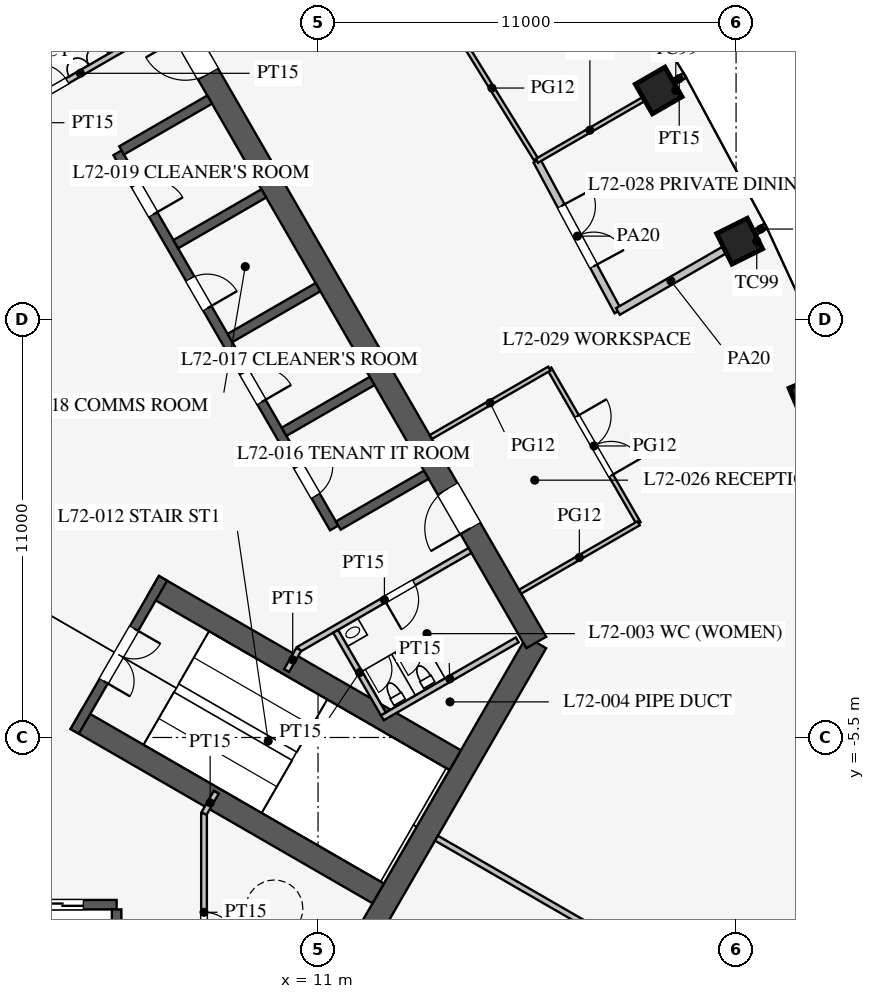
"""IFC4 building model, lengths in metres.
Left out: names, types, materials, properties, quantities, classifications, styles, units other than length and angle.
Written with IfcOpenShell. Run it as: python <this file> out.ifc"""

import sys

from ifc_helpers import new_model, si_unit, direction, frame, frame_2d, origin, origin_2d, place, context, subcontext, project, spatial, rectangle, extrude, element, fill, save


model = new_model("IFC4")
c1 = context("Model", 3, precision=1e-05, world=origin(), true_north=direction((0.0, 1.0)))
c2 = subcontext(c1, "Body", "Model", "MODEL_VIEW")
j1 = project(units=[si_unit("LENGTHUNIT", "METRE"), si_unit("PLANEANGLEUNIT", "RADIAN")], contexts=[c1])
p1 = place(None, origin())
s1 = spatial("IfcSite", under=j1, at=p1, CompositionType="ELEMENT")
p2 = place(p1, origin())
s2 = spatial("IfcBuilding", under=s1, at=p2, CompositionType="ELEMENT")
p3 = place(p2, frame((0.0, 0.0, 314.1)))
s3 = spatial("IfcBuildingStorey", under=s2, at=p3, CompositionType="ELEMENT", Elevation=314.1)
for number, where, z_axis, x_axis in (
    (1, (23.985, 3.455, 0.0), (0.0, 0.0, 1.0), (-0.391, 0.92, 0.0)),
    (2, (22.094, 7.56, 0.0), (0.0, 0.0, 1.0), (-0.447, 0.895, 0.0)),
    (3, (19.963, 11.526, 0.0), (0.0, 0.0, 1.0), (-0.5, 0.866, 0.0)),
):
    element("IfcColumn", number, at=place(p3, frame(where, z_axis=z_axis, x_axis=x_axis)), inside=s3, PredefinedType="COLUMN", context=c2, shape_type="SweptSolid", body=[
        extrude(rectangle(XDim=0.9, YDim=0.9, at=origin_2d()), origin(), (0.0, 0.0, 1.0), 4.2),
    ])
p4 = place(p3, frame((10.97, -13.0, 0.0), z_axis=(0.0, 0.0, 1.0), x_axis=(0.499995765644, 0.866027848477, 0.0)))
e4 = element("IfcWall", 4, at=p4, inside=s3, PredefinedType="SHEAR", context=c2, shape_type="SweptSolid", body=[
    extrude(rectangle(XDim=11.547, YDim=0.6, at=frame_2d((5.773, 0.0))), origin(), (0.0, 0.0, 1.0), 4.2),
])
p5 = place(p3, frame((16.743, -3.0, 0.0), z_axis=(0.0, 0.0, 1.0), x_axis=(-0.500002442456, 0.866023993627, 0.0)))
e5 = element("IfcWall", 5, at=p5, inside=s3, PredefinedType="SHEAR", context=c2, shape_type="SweptSolid", body=[
    extrude(rectangle(XDim=21.939, YDim=0.6, at=frame_2d((10.97, 0.0))), origin(), (0.0, 0.0, 1.0), 4.2),
])
p6 = place(p5, frame((17.27, 0.0, 0.0)))
e6 = element("IfcOpeningElement", 6, at=p6, cuts=e5, PredefinedType="OPENING", context=c2, shape_type="SweptSolid", body=[
    extrude(rectangle(XDim=1.2, YDim=2.1, at=frame_2d((0.6, 1.05))), frame((0.0, 0.31, 0.0), z_axis=(0.0, -1.0, 0.0), x_axis=(1.0, 0.0, 0.0)), (0.0, 0.0, 1.0), 0.62),
])
p7 = place(p5, frame((3.47, 0.0, 0.0)))
e7 = element("IfcOpeningElement", 7, at=p7, cuts=e5, PredefinedType="OPENING", context=c2, shape_type="SweptSolid", body=[
    extrude(rectangle(XDim=1.2, YDim=2.1, at=frame_2d((0.6, 1.05))), frame((0.0, 0.31, 0.0), z_axis=(0.0, -1.0, 0.0), x_axis=(1.0, 0.0, 0.0)), (0.0, 0.0, 1.0), 0.62),
])
p8 = place(p3, frame((-5.7, -9.9, 0.0), z_axis=(0.0, 0.0, 1.0), x_axis=(1.0, 0.0, 0.0)))
e8 = element("IfcWall", 8, at=p8, inside=s3, PredefinedType="SHEAR", context=c2, shape_type="SweptSolid", body=[
    extrude(rectangle(XDim=11.4, YDim=0.25, at=frame_2d((5.7, 0.0))), origin(), (0.0, 0.0, 1.0), 4.2),
])
p9 = place(p8, frame((0.875, 0.0, 0.0)))
e9 = element("IfcOpeningElement", 9, at=p9, cuts=e8, PredefinedType="OPENING", context=c2, shape_type="SweptSolid", body=[
    extrude(rectangle(XDim=1.1, YDim=2.2, at=frame_2d((0.55, 1.1))), frame((0.0, 0.135, 0.0), z_axis=(0.0, -1.0, 0.0), x_axis=(1.0, 0.0, 0.0)), (0.0, 0.0, 1.0), 0.27),
])
p10 = place(p8, frame((3.725, 0.0, 0.0)))
e10 = element("IfcOpeningElement", 10, at=p10, cuts=e8, PredefinedType="OPENING", context=c2, shape_type="SweptSolid", body=[
    extrude(rectangle(XDim=1.1, YDim=2.2, at=frame_2d((0.55, 1.1))), frame((0.0, 0.135, 0.0), z_axis=(0.0, -1.0, 0.0), x_axis=(1.0, 0.0, 0.0)), (0.0, 0.0, 1.0), 0.27),
])
p11 = place(p8, frame((6.575, 0.0, 0.0)))
e11 = element("IfcOpeningElement", 11, at=p11, cuts=e8, PredefinedType="OPENING", context=c2, shape_type="SweptSolid", body=[
    extrude(rectangle(XDim=1.1, YDim=2.2, at=frame_2d((0.55, 1.1))), frame((0.0, 0.135, 0.0), z_axis=(0.0, -1.0, 0.0), x_axis=(1.0, 0.0, 0.0)), (0.0, 0.0, 1.0), 0.27),
])
p12 = place(p8, frame((9.425, 0.0, 0.0)))
e12 = element("IfcOpeningElement", 12, at=p12, cuts=e8, PredefinedType="OPENING", context=c2, shape_type="SweptSolid", body=[
    extrude(rectangle(XDim=1.1, YDim=2.2, at=frame_2d((0.55, 1.1))), frame((0.0, 0.135, 0.0), z_axis=(0.0, -1.0, 0.0), x_axis=(1.0, 0.0, 0.0)), (0.0, 0.0, 1.0), 0.27),
])
p13 = place(p3, frame((5.7, -10.025, 0.0), z_axis=(0.0, 0.0, 1.0), x_axis=(0.0, -1.0, 0.0)))
e13 = element("IfcWall", 13, at=p13, inside=s3, PredefinedType="SHEAR", context=c2, shape_type="SweptSolid", body=[
    extrude(rectangle(XDim=2.675, YDim=0.25, at=frame_2d((1.337, 0.0))), origin(), (0.0, 0.0, 1.0), 4.2),
])
p14 = place(p3, frame((11.424, 0.014, 0.0), z_axis=(0.0, 0.0, 1.0), x_axis=(-0.500001763848, 0.866024385424, 0.0)))
e14 = element("IfcWall", 14, at=p14, inside=s3, PredefinedType="SHEAR", context=c2, shape_type="SweptSolid", body=[
    extrude(rectangle(XDim=11.4, YDim=0.25, at=frame_2d((5.7, 0.0))), origin(), (0.0, 0.0, 1.0), 4.2),
])
p15 = place(p14, frame((0.975, 0.0, 0.0)))
e15 = element("IfcOpeningElement", 15, at=p15, cuts=e14, PredefinedType="OPENING", context=c2, shape_type="SweptSolid", body=[
    extrude(rectangle(XDim=0.9, YDim=2.1, at=frame_2d((0.45, 1.05))), frame((0.0, 0.135, 0.0), z_axis=(0.0, -1.0, 0.0), x_axis=(1.0, 0.0, 0.0)), (0.0, 0.0, 1.0), 0.27),
])
p16 = place(p14, frame((3.825, 0.0, 0.0)))
e16 = element("IfcOpeningElement", 16, at=p16, cuts=e14, PredefinedType="OPENING", context=c2, shape_type="SweptSolid", body=[
    extrude(rectangle(XDim=0.9, YDim=2.1, at=frame_2d((0.45, 1.05))), frame((0.0, 0.135, 0.0), z_axis=(0.0, -1.0, 0.0), x_axis=(1.0, 0.0, 0.0)), (0.0, 0.0, 1.0), 0.27),
])
p17 = place(p14, frame((6.675, 0.0, 0.0)))
e17 = element("IfcOpeningElement", 17, at=p17, cuts=e14, PredefinedType="OPENING", context=c2, shape_type="SweptSolid", body=[
    extrude(rectangle(XDim=0.9, YDim=2.1, at=frame_2d((0.45, 1.05))), frame((0.0, 0.135, 0.0), z_axis=(0.0, -1.0, 0.0), x_axis=(1.0, 0.0, 0.0)), (0.0, 0.0, 1.0), 0.27),
])
p18 = place(p14, frame((9.525, 0.0, 0.0)))
e18 = element("IfcOpeningElement", 18, at=p18, cuts=e14, PredefinedType="OPENING", context=c2, shape_type="SweptSolid", body=[
    extrude(rectangle(XDim=0.9, YDim=2.1, at=frame_2d((0.45, 1.05))), frame((0.0, 0.135, 0.0), z_axis=(0.0, -1.0, 0.0), x_axis=(1.0, 0.0, 0.0)), (0.0, 0.0, 1.0), 0.27),
])
for number, where, z_axis, x_axis in (
    (19, (11.532, 0.076, 0.0), (0.0, 0.0, 1.0), (0.866, 0.5, 0.0)),
    (20, (10.107, 2.544, 0.0), (0.0, 0.0, 1.0), (0.866, 0.5, 0.0)),
    (21, (8.682, 5.012, 0.0), (0.0, 0.0, 1.0), (0.866, 0.5, 0.0)),
    (22, (7.257, 7.481, 0.0), (0.0, 0.0, 1.0), (0.866, 0.5, 0.0)),
    (23, (5.832, 9.949, 0.0), (0.0, 0.0, 1.0), (0.866, 0.5, 0.0)),
):
    element("IfcWall", number, at=place(p3, frame(where, z_axis=z_axis, x_axis=x_axis)), inside=s3, PredefinedType="SHEAR", context=c2, shape_type="SweptSolid", body=[
        extrude(rectangle(XDim=2.675, YDim=0.25, at=frame_2d((1.337, 0.0))), origin(), (0.0, 0.0, 1.0), 4.2),
    ])
p19 = place(p3, frame((4.638, -5.016, 0.0), z_axis=(0.0, 0.0, 1.0), x_axis=(0.866012320003, -0.50002266109, 0.0)))
e24 = element("IfcWall", 24, at=p19, inside=s3, PredefinedType="SHEAR", context=c2, shape_type="SweptSolid", body=[
    extrude(rectangle(XDim=9.175, YDim=0.6, at=frame_2d((4.587, 0.0))), origin(), (0.0, 0.0, 1.0), 4.2),
])
p20 = place(p3, frame((6.663, -1.509, 0.0), z_axis=(0.0, 0.0, 1.0), x_axis=(0.86603049496, -0.499991181721, 0.0)))
e25 = element("IfcWall", 25, at=p20, inside=s3, PredefinedType="SHEAR", context=c2, shape_type="SweptSolid", body=[
    extrude(rectangle(XDim=9.175, YDim=0.6, at=frame_2d((4.587, 0.0))), origin(), (0.0, 0.0, 1.0), 4.2),
])
p21 = place(p3, frame((4.597, -5.339, 0.0), z_axis=(0.0, 0.0, 1.0), x_axis=(0.499984536904, 0.866034331223, 0.0)))
e26 = element("IfcWall", 26, at=p21, inside=s3, PredefinedType="SHEAR", context=c2, shape_type="SweptSolid", body=[
    extrude(rectangle(XDim=4.65, YDim=0.25, at=frame_2d((2.325, 0.0))), origin(), (0.0, 0.0, 1.0), 4.2),
])
p22 = place(p21, frame((1.525, 0.0, 0.0)))
e27 = element("IfcOpeningElement", 27, at=p22, cuts=e26, PredefinedType="OPENING", context=c2, shape_type="SweptSolid", body=[
    extrude(rectangle(XDim=1.6, YDim=2.1, at=frame_2d((0.8, 1.05))), frame((0.0, 0.135, 0.0), z_axis=(0.0, -1.0, 0.0), x_axis=(1.0, 0.0, 0.0)), (0.0, 0.0, 1.0), 0.27),
])
p23 = place(p3, frame((8.0, -7.5, 0.0), z_axis=(0.0, 0.0, 1.0), x_axis=(0.0, -1.0, 0.0)))
e28 = element("IfcWall", 28, at=p23, inside=s3, PredefinedType="PARTITIONING", context=c2, shape_type="SweptSolid", body=[
    extrude(rectangle(XDim=5.2, YDim=0.15, at=frame_2d((2.6, 0.0))), origin(), (0.0, 0.0, 1.0), 4.0),
])
p24 = place(p23, frame((2.6, 0.0, 0.0)))
e29 = element("IfcOpeningElement", 29, at=p24, cuts=e28, PredefinedType="OPENING", context=c2, shape_type="SweptSolid", body=[
    extrude(rectangle(XDim=0.9, YDim=2.1, at=frame_2d((0.45, 1.05))), frame((0.0, 0.085, 0.0), z_axis=(0.0, -1.0, 0.0), x_axis=(1.0, 0.0, 0.0)), (0.0, 0.0, 1.0), 0.17),
])
p25 = place(p3, frame((2.495, 10.678, 0.0), z_axis=(0.0, 0.0, 1.0), x_axis=(0.866021400173, 0.500006934395, 0.0)))
e30 = element("IfcWall", 30, at=p25, inside=s3, PredefinedType="PARTITIONING", context=c2, shape_type="SweptSolid", body=[
    extrude(rectangle(XDim=5.2, YDim=0.15, at=frame_2d((2.6, 0.0))), origin(), (0.0, 0.0, 1.0), 4.0),
])
p26 = place(p25, frame((1.3, 0.0, 0.0)))
e31 = element("IfcOpeningElement", 31, at=p26, cuts=e30, PredefinedType="OPENING", context=c2, shape_type="SweptSolid", body=[
    extrude(rectangle(XDim=0.9, YDim=2.1, at=frame_2d((0.45, 1.05))), frame((0.0, 0.085, 0.0), z_axis=(0.0, -1.0, 0.0), x_axis=(1.0, 0.0, 0.0)), (0.0, 0.0, 1.0), 0.17),
])
p27 = place(p3, frame((10.495, -3.178, 0.0), z_axis=(0.0, 0.0, 1.0), x_axis=(0.866021400173, 0.500006934395, 0.0)))
e32 = element("IfcWall", 32, at=p27, inside=s3, PredefinedType="PARTITIONING", context=c2, shape_type="SweptSolid", body=[
    extrude(rectangle(XDim=5.2, YDim=0.15, at=frame_2d((2.6, 0.0))), origin(), (0.0, 0.0, 1.0), 4.0),
])
p28 = place(p27, frame((2.6, 0.0, 0.0)))
e33 = element("IfcOpeningElement", 33, at=p28, cuts=e32, PredefinedType="OPENING", context=c2, shape_type="SweptSolid", body=[
    extrude(rectangle(XDim=0.9, YDim=2.1, at=frame_2d((0.45, 1.05))), frame((0.0, 0.085, 0.0), z_axis=(0.0, -1.0, 0.0), x_axis=(1.0, 0.0, 0.0)), (0.0, 0.0, 1.0), 0.17),
])
for number, where, z_axis, x_axis in (
    (34, (8.0, -7.5, 0.0), (0.0, 0.0, 1.0), (0.5, 0.866, 0.0)),
    (35, (10.495, -3.178, 0.0), (0.0, 0.0, 1.0), (-0.5, -0.866, 0.0)),
):
    element("IfcWall", number, at=place(p3, frame(where, z_axis=z_axis, x_axis=x_axis)), inside=s3, PredefinedType="PARTITIONING", context=c2, shape_type="SweptSolid", body=[
        extrude(rectangle(XDim=0.645, YDim=0.15, at=frame_2d((0.323, 0.0))), origin(), (0.0, 0.0, 1.0), 4.0),
    ])
p29 = place(p3, frame((12.691, -4.982, 0.0), z_axis=(0.0, 0.0, 1.0), x_axis=(0.8660249478, 0.500000789788, 0.0)))
e36 = element("IfcWall", 36, at=p29, inside=s3, PredefinedType="PARTITIONING", context=c2, shape_type="SweptSolid", body=[
    extrude(rectangle(XDim=4.1, YDim=0.15, at=frame_2d((2.05, 0.0))), origin(), (0.0, 0.0, 1.0), 4.0),
])
p30 = place(p3, frame((11.464, -2.706, 0.0), z_axis=(0.0, 0.0, 1.0), x_axis=(0.50001992892, -0.866013897511, 0.0)))
e37 = element("IfcWall", 37, at=p30, inside=s3, PredefinedType="PARTITIONING", context=c2, shape_type="SweptSolid", body=[
    extrude(rectangle(XDim=2.51, YDim=0.15, at=frame_2d((1.255, 0.0))), origin(), (0.0, 0.0, 1.0), 4.0),
])
p31 = place(p3, frame((14.116, -8.15, 0.0), z_axis=(0.0, 0.0, 1.0), x_axis=(0.866020541135, -0.500008422262, 0.0)))
e38 = element("IfcWall", 38, at=p31, inside=s3, PredefinedType="PARTITIONING", context=c2, shape_type="SweptSolid", body=[
    extrude(rectangle(XDim=13.45, YDim=0.15, at=frame_2d((6.725, 0.0))), origin(), (0.0, 0.0, 1.0), 2.5),
])
p32 = place(p3, frame((19.436, 0.136, 0.0), z_axis=(0.0, 0.0, 1.0), x_axis=(-0.499977259774, 0.866038532462, 0.0)))
e39 = element("IfcWall", 39, at=p32, inside=s3, PredefinedType="PARTITIONING", context=c2, shape_type="SweptSolid", body=[
    extrude(rectangle(XDim=4.7, YDim=0.12, at=frame_2d((2.35, 0.0))), origin(), (0.0, 0.0, 1.0), 2.9),
])
p33 = place(p32, frame((1.45, 0.0, 0.15)))
e40 = element("IfcOpeningElement", 40, at=p33, cuts=e39, PredefinedType="OPENING", context=c2, shape_type="SweptSolid", body=[
    extrude(rectangle(XDim=1.8, YDim=2.1, at=frame_2d((0.9, 1.05))), frame((0.0, 0.07, 0.0), z_axis=(0.0, -1.0, 0.0), x_axis=(1.0, 0.0, 0.0)), (0.0, 0.0, 1.0), 0.14),
])
p34 = place(p3, frame((13.968, 2.406, 0.0), z_axis=(0.0, 0.0, 1.0), x_axis=(0.866035395735, 0.499982693035, 0.0)))
e41 = element("IfcWall", 41, at=p34, inside=s3, PredefinedType="PARTITIONING", context=c2, shape_type="SweptSolid", body=[
    extrude(rectangle(XDim=3.6, YDim=0.12, at=frame_2d((1.8, 0.0))), origin(), (0.0, 0.0, 1.0), 2.9),
])
p35 = place(p3, frame((16.318, -1.664, 0.0), z_axis=(0.0, 0.0, 1.0), x_axis=(0.866018442252, 0.500012057535, 0.0)))
e42 = element("IfcWall", 42, at=p35, inside=s3, PredefinedType="PARTITIONING", context=c2, shape_type="SweptSolid", body=[
    extrude(rectangle(XDim=3.6, YDim=0.12, at=frame_2d((1.8, 0.0))), origin(), (0.0, 0.0, 1.0), 2.9),
])
p36 = place(p3, frame((20.356, 11.753, 0.0), z_axis=(0.0, 0.0, 1.0), x_axis=(0.865899514186, 0.500217983815, 0.0)))
e43 = element("IfcWall", 43, at=p36, inside=s3, PredefinedType="PARTITIONING", context=c2, shape_type="SweptSolid", body=[
    extrude(rectangle(XDim=0.341, YDim=0.15, at=frame_2d((0.17, 0.0))), origin(), (0.0, 0.0, 1.0), 2.9),
])
p37 = place(p3, frame((22.51, 7.8, 0.0), z_axis=(0.0, 0.0, 1.0), x_axis=(0.866095534226, 0.499878510834, 0.0)))
e44 = element("IfcWall", 44, at=p37, inside=s3, PredefinedType="PARTITIONING", context=c2, shape_type="SweptSolid", body=[
    extrude(rectangle(XDim=0.316, YDim=0.15, at=frame_2d((0.158, 0.0))), origin(), (0.0, 0.0, 1.0), 2.9),
])
p38 = place(p3, frame((16.759, 9.676, 0.0), z_axis=(0.0, 0.0, 1.0), x_axis=(-0.525996140194, 0.850486954927, 0.0)))
e45 = element("IfcWall", 45, at=p38, inside=s3, PredefinedType="PARTITIONING", context=c2, shape_type="SweptSolid", body=[
    extrude(rectangle(XDim=4.502, YDim=0.12, at=frame_2d((2.251, 0.0))), origin(), (0.0, 0.0, 1.0), 2.9),
])
p39 = place(p3, frame((18.891, 5.71, 0.0), z_axis=(0.0, 0.0, 1.0), x_axis=(-0.473524102582, 0.880780860529, 0.0)))
e46 = element("IfcWall", 46, at=p39, inside=s3, PredefinedType="PARTITIONING", context=c2, shape_type="SweptSolid", body=[
    extrude(rectangle(XDim=4.502, YDim=0.2, at=frame_2d((2.251, 0.0))), origin(), (0.0, 0.0, 1.0), 2.9),
])
p40 = place(p39, frame((1.35, 0.0, 0.15)))
e47 = element("IfcOpeningElement", 47, at=p40, cuts=e46, PredefinedType="OPENING", context=c2, shape_type="SweptSolid", body=[
    extrude(rectangle(XDim=1.8, YDim=2.1, at=frame_2d((0.9, 1.05))), frame((0.0, 0.11, 0.0), z_axis=(0.0, -1.0, 0.0), x_axis=(1.0, 0.0, 0.0)), (0.0, 0.0, 1.0), 0.22),
])
p41 = place(p3, frame((16.759, 9.676, 0.0), z_axis=(0.0, 0.0, 1.0), x_axis=(0.866008816382, 0.500028729123, 0.0)))
e48 = element("IfcWall", 48, at=p41, inside=s3, PredefinedType="PARTITIONING", context=c2, shape_type="SweptSolid", body=[
    extrude(rectangle(XDim=3.22, YDim=0.12, at=frame_2d((1.61, 0.0))), origin(), (0.0, 0.0, 1.0), 2.9),
])
p42 = place(p3, frame((18.891, 5.71, 0.0), z_axis=(0.0, 0.0, 1.0), x_axis=(0.866021328928, 0.500007057792, 0.0)))
e49 = element("IfcWall", 49, at=p42, inside=s3, PredefinedType="PARTITIONING", context=c2, shape_type="SweptSolid", body=[
    extrude(rectangle(XDim=3.218, YDim=0.2, at=frame_2d((1.609, 0.0))), origin(), (0.0, 0.0, 1.0), 2.9),
])
p43 = place(p24, origin())
e50 = element("IfcDoor", 50, at=p43, inside=s3, OperationType="SINGLE_SWING_RIGHT", PredefinedType="DOOR", context=c2, shape_type="SweptSolid", body=[
    extrude(rectangle(XDim=0.9, YDim=2.1, at=frame_2d((0.45, 1.05))), frame((0.0, 0.025, 0.0), z_axis=(0.0, -1.0, 0.0), x_axis=(1.0, 0.0, 0.0)), (0.0, 0.0, 1.0), 0.05),
])
fill(e29, e50)
p44 = place(p26, origin())
e51 = element("IfcDoor", 51, at=p44, inside=s3, OperationType="SINGLE_SWING_LEFT", PredefinedType="DOOR", context=c2, shape_type="SweptSolid", body=[
    extrude(rectangle(XDim=0.9, YDim=2.1, at=frame_2d((0.45, 1.05))), frame((0.0, 0.025, 0.0), z_axis=(0.0, -1.0, 0.0), x_axis=(1.0, 0.0, 0.0)), (0.0, 0.0, 1.0), 0.05),
])
fill(e31, e51)
p45 = place(p28, frame((0.9, 0.0, 0.0), z_axis=(0.0, 0.0, 1.0), x_axis=(-1.0, 0.0, 0.0)))
e52 = element("IfcDoor", 52, at=p45, inside=s3, OperationType="SINGLE_SWING_RIGHT", PredefinedType="DOOR", context=c2, shape_type="SweptSolid", body=[
    extrude(rectangle(XDim=0.9, YDim=2.1, at=frame_2d((0.45, 1.05))), frame((0.0, 0.025, 0.0), z_axis=(0.0, -1.0, 0.0), x_axis=(1.0, 0.0, 0.0)), (0.0, 0.0, 1.0), 0.05),
])
fill(e33, e52)
p46 = place(p22, frame((1.6, 0.0, 0.0), z_axis=(0.0, 0.0, 1.0), x_axis=(-1.0, 0.0, 0.0)))
e53 = element("IfcDoor", 53, at=p46, inside=s3, OperationType="DOUBLE_DOOR_SINGLE_SWING", PredefinedType="DOOR", context=c2, shape_type="SweptSolid", body=[
    extrude(rectangle(XDim=1.6, YDim=2.1, at=frame_2d((0.8, 1.05))), frame((0.0, 0.025, 0.0), z_axis=(0.0, -1.0, 0.0), x_axis=(1.0, 0.0, 0.0)), (0.0, 0.0, 1.0), 0.05),
])
fill(e27, e53)
p47 = place(p6, origin())
e54 = element("IfcDoor", 54, at=p47, inside=s3, OperationType="SINGLE_SWING_RIGHT", PredefinedType="DOOR", context=c2, shape_type="SweptSolid", body=[
    extrude(rectangle(XDim=1.2, YDim=2.1, at=frame_2d((0.6, 1.05))), frame((0.0, 0.025, 0.0), z_axis=(0.0, -1.0, 0.0), x_axis=(1.0, 0.0, 0.0)), (0.0, 0.0, 1.0), 0.05),
])
fill(e6, e54)
p48 = place(p7, origin())
e55 = element("IfcDoor", 55, at=p48, inside=s3, OperationType="SINGLE_SWING_LEFT", PredefinedType="DOOR", context=c2, shape_type="SweptSolid", body=[
    extrude(rectangle(XDim=1.2, YDim=2.1, at=frame_2d((0.6, 1.05))), frame((0.0, 0.025, 0.0), z_axis=(0.0, -1.0, 0.0), x_axis=(1.0, 0.0, 0.0)), (0.0, 0.0, 1.0), 0.05),
])
fill(e7, e55)
p49 = place(p15, frame((0.9, 0.0, 0.0), z_axis=(0.0, 0.0, 1.0), x_axis=(-1.0, 0.0, 0.0)))
e56 = element("IfcDoor", 56, at=p49, inside=s3, OperationType="SINGLE_SWING_LEFT", PredefinedType="DOOR", context=c2, shape_type="SweptSolid", body=[
    extrude(rectangle(XDim=0.9, YDim=2.1, at=frame_2d((0.45, 1.05))), frame((0.0, 0.025, 0.0), z_axis=(0.0, -1.0, 0.0), x_axis=(1.0, 0.0, 0.0)), (0.0, 0.0, 1.0), 0.05),
])
fill(e15, e56)
p50 = place(p16, frame((0.9, 0.0, 0.0), z_axis=(0.0, 0.0, 1.0), x_axis=(-1.0, 0.0, 0.0)))
e57 = element("IfcDoor", 57, at=p50, inside=s3, OperationType="SINGLE_SWING_RIGHT", PredefinedType="DOOR", context=c2, shape_type="SweptSolid", body=[
    extrude(rectangle(XDim=0.9, YDim=2.1, at=frame_2d((0.45, 1.05))), frame((0.0, 0.025, 0.0), z_axis=(0.0, -1.0, 0.0), x_axis=(1.0, 0.0, 0.0)), (0.0, 0.0, 1.0), 0.05),
])
fill(e16, e57)
p51 = place(p17, frame((0.9, 0.0, 0.0), z_axis=(0.0, 0.0, 1.0), x_axis=(-1.0, 0.0, 0.0)))
e58 = element("IfcDoor", 58, at=p51, inside=s3, OperationType="SINGLE_SWING_RIGHT", PredefinedType="DOOR", context=c2, shape_type="SweptSolid", body=[
    extrude(rectangle(XDim=0.9, YDim=2.1, at=frame_2d((0.45, 1.05))), frame((0.0, 0.025, 0.0), z_axis=(0.0, -1.0, 0.0), x_axis=(1.0, 0.0, 0.0)), (0.0, 0.0, 1.0), 0.05),
])
fill(e17, e58)
p52 = place(p18, frame((0.9, 0.0, 0.0), z_axis=(0.0, 0.0, 1.0), x_axis=(-1.0, 0.0, 0.0)))
e59 = element("IfcDoor", 59, at=p52, inside=s3, OperationType="SINGLE_SWING_RIGHT", PredefinedType="DOOR", context=c2, shape_type="SweptSolid", body=[
    extrude(rectangle(XDim=0.9, YDim=2.1, at=frame_2d((0.45, 1.05))), frame((0.0, 0.025, 0.0), z_axis=(0.0, -1.0, 0.0), x_axis=(1.0, 0.0, 0.0)), (0.0, 0.0, 1.0), 0.05),
])
fill(e18, e59)
p53 = place(p33, frame((1.8, 0.0, 0.0), z_axis=(0.0, 0.0, 1.0), x_axis=(-1.0, 0.0, 0.0)))
e60 = element("IfcDoor", 60, at=p53, inside=s3, OperationType="DOUBLE_DOOR_SINGLE_SWING", PredefinedType="DOOR", context=c2, shape_type="SweptSolid", body=[
    extrude(rectangle(XDim=1.8, YDim=2.1, at=frame_2d((0.9, 1.05))), frame((0.0, 0.025, 0.0), z_axis=(0.0, -1.0, 0.0), x_axis=(1.0, 0.0, 0.0)), (0.0, 0.0, 1.0), 0.05),
])
fill(e40, e60)
p54 = place(p40, frame((1.8, 0.0, 0.0), z_axis=(0.0, 0.0, 1.0), x_axis=(-1.0, 0.0, 0.0)))
e61 = element("IfcDoor", 61, at=p54, inside=s3, OperationType="DOUBLE_DOOR_SINGLE_SWING", PredefinedType="DOOR", context=c2, shape_type="SweptSolid", body=[
    extrude(rectangle(XDim=1.8, YDim=2.1, at=frame_2d((0.9, 1.05))), frame((0.0, 0.025, 0.0), z_axis=(0.0, -1.0, 0.0), x_axis=(1.0, 0.0, 0.0)), (0.0, 0.0, 1.0), 0.05),
])
fill(e47, e61)
p55 = place(p12, origin())
e62 = element("IfcDoor", 62, at=p55, inside=s3, OperationType="DOUBLE_DOOR_SLIDING", PredefinedType="DOOR", context=c2, shape_type="SweptSolid", body=[
    extrude(rectangle(XDim=1.1, YDim=2.2, at=frame_2d((0.55, 1.1))), frame((0.0, 0.025, 0.0), z_axis=(0.0, -1.0, 0.0), x_axis=(1.0, 0.0, 0.0)), (0.0, 0.0, 1.0), 0.05),
])
fill(e12, e62)
save(model, sys.argv[1])
